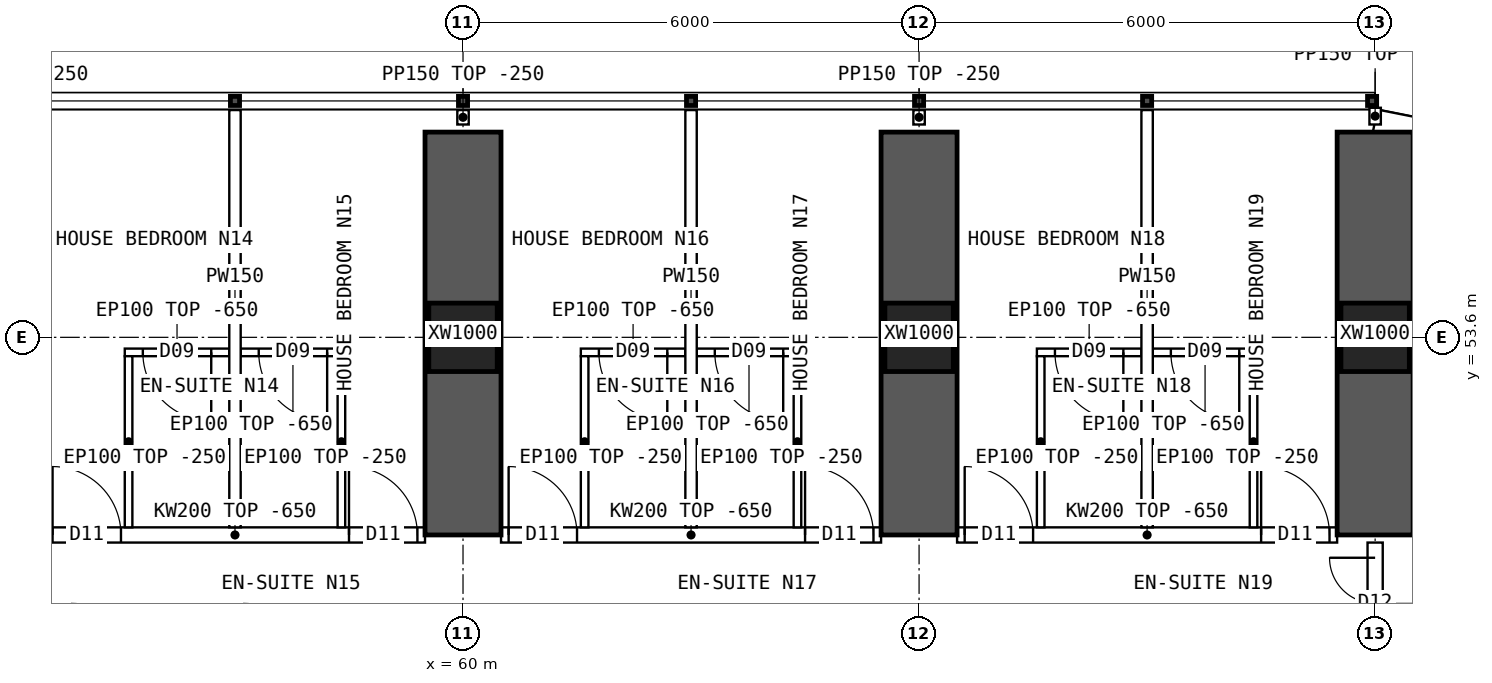
"""IFC4 building model, lengths in metres.
Left out: names, types, materials, properties, quantities, classifications, styles, units other than length and angle.
Written with IfcOpenShell. Run it as: python <this file> out.ifc"""

import sys

from ifc_helpers import new_model, si_unit, direction, frame, frame_2d, origin, origin_2d, place, context, subcontext, project, spatial, polyline, rectangle, hollow_rectangle, outline, extrude, element, fill, save


model = new_model("IFC4")
c1 = context("Model", 3, precision=1e-05, world=origin(), true_north=direction((0.0, 1.0)))
c2 = subcontext(c1, "Body", "Model", "MODEL_VIEW")
j1 = project(units=[si_unit("LENGTHUNIT", "METRE"), si_unit("PLANEANGLEUNIT", "RADIAN")], contexts=[c1])
p1 = place(None, origin())
s1 = spatial("IfcSite", under=j1, at=p1, CompositionType="ELEMENT")
p2 = place(p1, origin())
s2 = spatial("IfcBuilding", under=s1, at=p2, CompositionType="ELEMENT")
p3 = place(p2, frame((0.0, 0.0, 31.45)))
s3 = spatial("IfcBuildingStorey", under=s2, at=p3, CompositionType="ELEMENT", Elevation=31.45)
for number, where, z_axis, x_axis in (
    (1, (60.0, 53.6, 0.0), (0.0, 0.0, 1.0), (1.0, 0.0, 0.0)),
    (2, (66.0, 53.6, 0.0), (0.0, 0.0, 1.0), (1.0, 0.0, 0.0)),
    (3, (72.0, 53.6, 0.0), (0.0, 0.0, 1.0), (1.0, 0.0, 0.0)),
):
    element("IfcColumn", number, at=place(p3, frame(where, z_axis=z_axis, x_axis=x_axis)), inside=s3, PredefinedType="COLUMN", context=c2, shape_type="SweptSolid", body=[
        extrude(hollow_rectangle(XDim=0.9, YDim=0.9, WallThickness=0.09, at=origin_2d()), origin(), (0.0, 0.0, 1.0), 3.75),
    ])
for number, where, z_axis, x_axis in (
    (4, (60.0, 51.0, 0.0), (0.0, 0.0, 1.0), (0.0, 1.0, 0.0)),
    (5, (66.0, 51.0, 0.0), (0.0, 0.0, 1.0), (0.0, 1.0, 0.0)),
    (6, (72.0, 51.0, 0.0), (0.0, 0.0, 1.0), (0.0, 1.0, 0.0)),
):
    element("IfcWall", number, at=place(p3, frame(where, z_axis=z_axis, x_axis=x_axis)), inside=s3, PredefinedType="SHEAR", context=c2, shape_type="SweptSolid", body=[
        extrude(rectangle(XDim=5.3, YDim=1.0, at=frame_2d((2.65, 0.0))), origin(), (0.0, 0.0, 1.0), 3.75),
    ])
p4 = place(p3, frame((75.157, 55.822, 0.0), z_axis=(0.0, 0.0, 1.0), x_axis=(-0.980787251524, 0.195080412259, 0.0)))
e7 = element("IfcWall", 7, at=p4, inside=s3, PredefinedType="SOLIDWALL", context=c2, shape_type="SweptSolid", body=[
    extrude(outline(polyline([(-0.03, -0.15), (3.249, -0.15), (3.189, 0.15), (0.03, 0.15), (-0.03, -0.15)])), origin(), (0.0, 0.0, 1.0), 3.5),
])
p5 = place(p4, frame((0.909, 0.0, 0.9)))
e8 = element("IfcOpeningElement", 8, at=p5, cuts=e7, PredefinedType="OPENING", context=c2, shape_type="SweptSolid", body=[
    extrude(rectangle(XDim=1.4, YDim=1.8, at=frame_2d((0.7, 0.9))), frame((0.0, 0.16, 0.0), z_axis=(0.0, -1.0, 0.0), x_axis=(1.0, 0.0, 0.0)), (0.0, 0.0, 1.0), 0.32),
])
p6 = place(p3, frame((54.5, 51.0, 0.0), z_axis=(0.0, 0.0, 1.0), x_axis=(1.0, 0.0, 0.0)))
e9 = element("IfcWall", 9, at=p6, inside=s3, PredefinedType="SOLIDWALL", context=c2, shape_type="SweptSolid", body=[
    extrude(outline(polyline([(0.0, 0.0), (5.0, 0.0), (5.0, 3.1), (0.0, 3.1), (0.0, 0.0)])), frame((0.0, 0.1, 0.0), z_axis=(0.0, -1.0, 0.0), x_axis=(1.0, 0.0, 0.0)), (0.0, 0.0, 1.0), 0.2),
])
p7 = place(p6, frame((0.1, 0.0, 0.0)))
e10 = element("IfcOpeningElement", 10, at=p7, cuts=e9, PredefinedType="OPENING", context=c2, shape_type="SweptSolid", body=[
    extrude(rectangle(XDim=0.9, YDim=2.1, at=frame_2d((0.45, 1.05))), frame((0.0, 0.11, 0.0), z_axis=(0.0, -1.0, 0.0), x_axis=(1.0, 0.0, 0.0)), (0.0, 0.0, 1.0), 0.22),
])
p8 = place(p6, frame((4.0, 0.0, 0.0)))
e11 = element("IfcOpeningElement", 11, at=p8, cuts=e9, PredefinedType="OPENING", context=c2, shape_type="SweptSolid", body=[
    extrude(rectangle(XDim=0.9, YDim=2.1, at=frame_2d((0.45, 1.05))), frame((0.0, 0.11, 0.0), z_axis=(0.0, -1.0, 0.0), x_axis=(1.0, 0.0, 0.0)), (0.0, 0.0, 1.0), 0.22),
])
p9 = place(p3, frame((60.5, 51.0, 0.0), z_axis=(0.0, 0.0, 1.0), x_axis=(1.0, 0.0, 0.0)))
e12 = element("IfcWall", 12, at=p9, inside=s3, PredefinedType="SOLIDWALL", context=c2, shape_type="SweptSolid", body=[
    extrude(outline(polyline([(0.0, 0.0), (5.0, 0.0), (5.0, 3.1), (0.0, 3.1), (0.0, 0.0)])), frame((0.0, 0.1, 0.0), z_axis=(0.0, -1.0, 0.0), x_axis=(1.0, 0.0, 0.0)), (0.0, 0.0, 1.0), 0.2),
])
p10 = place(p9, frame((0.1, 0.0, 0.0)))
e13 = element("IfcOpeningElement", 13, at=p10, cuts=e12, PredefinedType="OPENING", context=c2, shape_type="SweptSolid", body=[
    extrude(rectangle(XDim=0.9, YDim=2.1, at=frame_2d((0.45, 1.05))), frame((0.0, 0.11, 0.0), z_axis=(0.0, -1.0, 0.0), x_axis=(1.0, 0.0, 0.0)), (0.0, 0.0, 1.0), 0.22),
])
p11 = place(p9, frame((4.0, 0.0, 0.0)))
e14 = element("IfcOpeningElement", 14, at=p11, cuts=e12, PredefinedType="OPENING", context=c2, shape_type="SweptSolid", body=[
    extrude(rectangle(XDim=0.9, YDim=2.1, at=frame_2d((0.45, 1.05))), frame((0.0, 0.11, 0.0), z_axis=(0.0, -1.0, 0.0), x_axis=(1.0, 0.0, 0.0)), (0.0, 0.0, 1.0), 0.22),
])
p12 = place(p3, frame((66.5, 51.0, 0.0), z_axis=(0.0, 0.0, 1.0), x_axis=(1.0, 0.0, 0.0)))
e15 = element("IfcWall", 15, at=p12, inside=s3, PredefinedType="SOLIDWALL", context=c2, shape_type="SweptSolid", body=[
    extrude(outline(polyline([(0.0, 0.0), (5.0, 0.0), (5.0, 3.1), (0.0, 3.1), (0.0, 0.0)])), frame((0.0, 0.1, 0.0), z_axis=(0.0, -1.0, 0.0), x_axis=(1.0, 0.0, 0.0)), (0.0, 0.0, 1.0), 0.2),
])
p13 = place(p12, frame((0.1, 0.0, 0.0)))
e16 = element("IfcOpeningElement", 16, at=p13, cuts=e15, PredefinedType="OPENING", context=c2, shape_type="SweptSolid", body=[
    extrude(rectangle(XDim=0.9, YDim=2.1, at=frame_2d((0.45, 1.05))), frame((0.0, 0.11, 0.0), z_axis=(0.0, -1.0, 0.0), x_axis=(1.0, 0.0, 0.0)), (0.0, 0.0, 1.0), 0.22),
])
p14 = place(p12, frame((4.0, 0.0, 0.0)))
e17 = element("IfcOpeningElement", 17, at=p14, cuts=e15, PredefinedType="OPENING", context=c2, shape_type="SweptSolid", body=[
    extrude(rectangle(XDim=0.9, YDim=2.1, at=frame_2d((0.45, 1.05))), frame((0.0, 0.11, 0.0), z_axis=(0.0, -1.0, 0.0), x_axis=(1.0, 0.0, 0.0)), (0.0, 0.0, 1.0), 0.22),
])
p15 = place(p3, frame((57.0, 56.59, 0.0), z_axis=(0.0, 0.0, 1.0), x_axis=(0.0, -1.0, 0.0)))
e18 = element("IfcWall", 18, at=p15, inside=s3, PredefinedType="PARTITIONING", context=c2, shape_type="SweptSolid", body=[
    extrude(outline(polyline([(0.0, 0.0), (5.49, 0.0), (5.49, 3.1), (5.442, 3.1), (5.44, 3.5), (3.192, 3.5), (3.19, 3.1), (2.792, 3.1), (2.79, 3.5), (0.0, 3.5), (0.0, 0.0)])), frame((0.0, 0.075, 0.0), z_axis=(0.0, -1.0, 0.0), x_axis=(1.0, 0.0, 0.0)), (0.0, 0.0, 1.0), 0.15),
])
p16 = place(p3, frame((55.55, 53.402, 0.0), z_axis=(0.0, 0.0, 1.0), x_axis=(1.0, 0.0, 0.0)))
e19 = element("IfcWall", 19, at=p16, inside=s3, PredefinedType="PARTITIONING", context=c2, shape_type="SweptSolid", body=[
    extrude(outline(polyline([(0.0, 0.0), (1.375, 0.0), (1.375, 3.1), (0.0, 3.1), (0.0, 0.0)])), frame((0.0, 0.05, 0.0), z_axis=(0.0, -1.0, 0.0), x_axis=(1.0, 0.0, 0.0)), (0.0, 0.0, 1.0), 0.1),
])
p17 = place(p16, frame((0.238, 0.0, 0.0)))
e20 = element("IfcOpeningElement", 20, at=p17, cuts=e19, PredefinedType="OPENING", context=c2, shape_type="SweptSolid", body=[
    extrude(rectangle(XDim=0.9, YDim=2.1, at=frame_2d((0.45, 1.05))), frame((0.0, 0.06, 0.0), z_axis=(0.0, -1.0, 0.0), x_axis=(1.0, 0.0, 0.0)), (0.0, 0.0, 1.0), 0.12),
])
p18 = place(p3, frame((55.6, 53.352, 0.0), z_axis=(0.0, 0.0, 1.0), x_axis=(0.0, -1.0, 0.0)))
e21 = element("IfcWall", 21, at=p18, inside=s3, PredefinedType="PARTITIONING", context=c2, shape_type="SweptSolid", body=[
    extrude(outline(polyline([(0.0, 0.0), (2.252, 0.0), (2.252, 3.1), (2.204, 3.1), (2.202, 3.5), (0.0, 3.5), (0.0, 0.0)])), frame((0.0, 0.05, 0.0), z_axis=(0.0, -1.0, 0.0), x_axis=(1.0, 0.0, 0.0)), (0.0, 0.0, 1.0), 0.1),
])
p19 = place(p3, frame((57.075, 53.402, 0.0), z_axis=(0.0, 0.0, 1.0), x_axis=(1.0, 0.0, 0.0)))
e22 = element("IfcWall", 22, at=p19, inside=s3, PredefinedType="PARTITIONING", context=c2, shape_type="SweptSolid", body=[
    extrude(outline(polyline([(0.0, 0.0), (1.375, 0.0), (1.375, 3.1), (0.0, 3.1), (0.0, 0.0)])), frame((0.0, 0.05, 0.0), z_axis=(0.0, -1.0, 0.0), x_axis=(1.0, 0.0, 0.0)), (0.0, 0.0, 1.0), 0.1),
])
p20 = place(p19, frame((0.238, 0.0, 0.0)))
e23 = element("IfcOpeningElement", 23, at=p20, cuts=e22, PredefinedType="OPENING", context=c2, shape_type="SweptSolid", body=[
    extrude(rectangle(XDim=0.9, YDim=2.1, at=frame_2d((0.45, 1.05))), frame((0.0, 0.06, 0.0), z_axis=(0.0, -1.0, 0.0), x_axis=(1.0, 0.0, 0.0)), (0.0, 0.0, 1.0), 0.12),
])
p21 = place(p3, frame((58.4, 53.352, 0.0), z_axis=(0.0, 0.0, 1.0), x_axis=(0.0, -1.0, 0.0)))
e24 = element("IfcWall", 24, at=p21, inside=s3, PredefinedType="PARTITIONING", context=c2, shape_type="SweptSolid", body=[
    extrude(outline(polyline([(0.0, 0.0), (2.252, 0.0), (2.252, 3.1), (2.204, 3.1), (2.202, 3.5), (0.0, 3.5), (0.0, 0.0)])), frame((0.0, 0.05, 0.0), z_axis=(0.0, -1.0, 0.0), x_axis=(1.0, 0.0, 0.0)), (0.0, 0.0, 1.0), 0.1),
])
p22 = place(p3, frame((63.0, 56.59, 0.0), z_axis=(0.0, 0.0, 1.0), x_axis=(0.0, -1.0, 0.0)))
e25 = element("IfcWall", 25, at=p22, inside=s3, PredefinedType="PARTITIONING", context=c2, shape_type="SweptSolid", body=[
    extrude(outline(polyline([(0.0, 0.0), (5.49, 0.0), (5.49, 3.1), (5.442, 3.1), (5.44, 3.5), (3.192, 3.5), (3.19, 3.1), (2.792, 3.1), (2.79, 3.5), (0.0, 3.5), (0.0, 0.0)])), frame((0.0, 0.075, 0.0), z_axis=(0.0, -1.0, 0.0), x_axis=(1.0, 0.0, 0.0)), (0.0, 0.0, 1.0), 0.15),
])
p23 = place(p3, frame((61.55, 53.402, 0.0), z_axis=(0.0, 0.0, 1.0), x_axis=(1.0, 0.0, 0.0)))
e26 = element("IfcWall", 26, at=p23, inside=s3, PredefinedType="PARTITIONING", context=c2, shape_type="SweptSolid", body=[
    extrude(outline(polyline([(0.0, 0.0), (1.375, 0.0), (1.375, 3.1), (0.0, 3.1), (0.0, 0.0)])), frame((0.0, 0.05, 0.0), z_axis=(0.0, -1.0, 0.0), x_axis=(1.0, 0.0, 0.0)), (0.0, 0.0, 1.0), 0.1),
])
p24 = place(p23, frame((0.238, 0.0, 0.0)))
e27 = element("IfcOpeningElement", 27, at=p24, cuts=e26, PredefinedType="OPENING", context=c2, shape_type="SweptSolid", body=[
    extrude(rectangle(XDim=0.9, YDim=2.1, at=frame_2d((0.45, 1.05))), frame((0.0, 0.06, 0.0), z_axis=(0.0, -1.0, 0.0), x_axis=(1.0, 0.0, 0.0)), (0.0, 0.0, 1.0), 0.12),
])
p25 = place(p3, frame((61.6, 53.352, 0.0), z_axis=(0.0, 0.0, 1.0), x_axis=(0.0, -1.0, 0.0)))
e28 = element("IfcWall", 28, at=p25, inside=s3, PredefinedType="PARTITIONING", context=c2, shape_type="SweptSolid", body=[
    extrude(outline(polyline([(0.0, 0.0), (2.252, 0.0), (2.252, 3.1), (2.204, 3.1), (2.202, 3.5), (0.0, 3.5), (0.0, 0.0)])), frame((0.0, 0.05, 0.0), z_axis=(0.0, -1.0, 0.0), x_axis=(1.0, 0.0, 0.0)), (0.0, 0.0, 1.0), 0.1),
])
p26 = place(p3, frame((63.075, 53.402, 0.0), z_axis=(0.0, 0.0, 1.0), x_axis=(1.0, 0.0, 0.0)))
e29 = element("IfcWall", 29, at=p26, inside=s3, PredefinedType="PARTITIONING", context=c2, shape_type="SweptSolid", body=[
    extrude(outline(polyline([(0.0, 0.0), (1.375, 0.0), (1.375, 3.1), (0.0, 3.1), (0.0, 0.0)])), frame((0.0, 0.05, 0.0), z_axis=(0.0, -1.0, 0.0), x_axis=(1.0, 0.0, 0.0)), (0.0, 0.0, 1.0), 0.1),
])
p27 = place(p26, frame((0.238, 0.0, 0.0)))
e30 = element("IfcOpeningElement", 30, at=p27, cuts=e29, PredefinedType="OPENING", context=c2, shape_type="SweptSolid", body=[
    extrude(rectangle(XDim=0.9, YDim=2.1, at=frame_2d((0.45, 1.05))), frame((0.0, 0.06, 0.0), z_axis=(0.0, -1.0, 0.0), x_axis=(1.0, 0.0, 0.0)), (0.0, 0.0, 1.0), 0.12),
])
p28 = place(p3, frame((64.4, 53.352, 0.0), z_axis=(0.0, 0.0, 1.0), x_axis=(0.0, -1.0, 0.0)))
e31 = element("IfcWall", 31, at=p28, inside=s3, PredefinedType="PARTITIONING", context=c2, shape_type="SweptSolid", body=[
    extrude(outline(polyline([(0.0, 0.0), (2.252, 0.0), (2.252, 3.1), (2.204, 3.1), (2.202, 3.5), (0.0, 3.5), (0.0, 0.0)])), frame((0.0, 0.05, 0.0), z_axis=(0.0, -1.0, 0.0), x_axis=(1.0, 0.0, 0.0)), (0.0, 0.0, 1.0), 0.1),
])
p29 = place(p3, frame((69.0, 56.59, 0.0), z_axis=(0.0, 0.0, 1.0), x_axis=(0.0, -1.0, 0.0)))
e32 = element("IfcWall", 32, at=p29, inside=s3, PredefinedType="PARTITIONING", context=c2, shape_type="SweptSolid", body=[
    extrude(outline(polyline([(0.0, 0.0), (5.49, 0.0), (5.49, 3.1), (5.442, 3.1), (5.44, 3.5), (3.192, 3.5), (3.19, 3.1), (2.792, 3.1), (2.79, 3.5), (0.0, 3.5), (0.0, 0.0)])), frame((0.0, 0.075, 0.0), z_axis=(0.0, -1.0, 0.0), x_axis=(1.0, 0.0, 0.0)), (0.0, 0.0, 1.0), 0.15),
])
p30 = place(p3, frame((67.55, 53.402, 0.0), z_axis=(0.0, 0.0, 1.0), x_axis=(1.0, 0.0, 0.0)))
e33 = element("IfcWall", 33, at=p30, inside=s3, PredefinedType="PARTITIONING", context=c2, shape_type="SweptSolid", body=[
    extrude(outline(polyline([(0.0, 0.0), (1.375, 0.0), (1.375, 3.1), (0.0, 3.1), (0.0, 0.0)])), frame((0.0, 0.05, 0.0), z_axis=(0.0, -1.0, 0.0), x_axis=(1.0, 0.0, 0.0)), (0.0, 0.0, 1.0), 0.1),
])
p31 = place(p30, frame((0.238, 0.0, 0.0)))
e34 = element("IfcOpeningElement", 34, at=p31, cuts=e33, PredefinedType="OPENING", context=c2, shape_type="SweptSolid", body=[
    extrude(rectangle(XDim=0.9, YDim=2.1, at=frame_2d((0.45, 1.05))), frame((0.0, 0.06, 0.0), z_axis=(0.0, -1.0, 0.0), x_axis=(1.0, 0.0, 0.0)), (0.0, 0.0, 1.0), 0.12),
])
p32 = place(p3, frame((67.6, 53.352, 0.0), z_axis=(0.0, 0.0, 1.0), x_axis=(0.0, -1.0, 0.0)))
e35 = element("IfcWall", 35, at=p32, inside=s3, PredefinedType="PARTITIONING", context=c2, shape_type="SweptSolid", body=[
    extrude(outline(polyline([(0.0, 0.0), (2.252, 0.0), (2.252, 3.1), (2.204, 3.1), (2.202, 3.5), (0.0, 3.5), (0.0, 0.0)])), frame((0.0, 0.05, 0.0), z_axis=(0.0, -1.0, 0.0), x_axis=(1.0, 0.0, 0.0)), (0.0, 0.0, 1.0), 0.1),
])
p33 = place(p3, frame((69.075, 53.402, 0.0), z_axis=(0.0, 0.0, 1.0), x_axis=(1.0, 0.0, 0.0)))
e36 = element("IfcWall", 36, at=p33, inside=s3, PredefinedType="PARTITIONING", context=c2, shape_type="SweptSolid", body=[
    extrude(outline(polyline([(0.0, 0.0), (1.375, 0.0), (1.375, 3.1), (0.0, 3.1), (0.0, 0.0)])), frame((0.0, 0.05, 0.0), z_axis=(0.0, -1.0, 0.0), x_axis=(1.0, 0.0, 0.0)), (0.0, 0.0, 1.0), 0.1),
])
p34 = place(p33, frame((0.238, 0.0, 0.0)))
e37 = element("IfcOpeningElement", 37, at=p34, cuts=e36, PredefinedType="OPENING", context=c2, shape_type="SweptSolid", body=[
    extrude(rectangle(XDim=0.9, YDim=2.1, at=frame_2d((0.45, 1.05))), frame((0.0, 0.06, 0.0), z_axis=(0.0, -1.0, 0.0), x_axis=(1.0, 0.0, 0.0)), (0.0, 0.0, 1.0), 0.12),
])
p35 = place(p3, frame((70.4, 53.352, 0.0), z_axis=(0.0, 0.0, 1.0), x_axis=(0.0, -1.0, 0.0)))
e38 = element("IfcWall", 38, at=p35, inside=s3, PredefinedType="PARTITIONING", context=c2, shape_type="SweptSolid", body=[
    extrude(outline(polyline([(0.0, 0.0), (2.252, 0.0), (2.252, 3.1), (2.204, 3.1), (2.202, 3.5), (0.0, 3.5), (0.0, 0.0)])), frame((0.0, 0.05, 0.0), z_axis=(0.0, -1.0, 0.0), x_axis=(1.0, 0.0, 0.0)), (0.0, 0.0, 1.0), 0.1),
])
p36 = place(p3, frame((72.0, 49.3, 0.0), z_axis=(0.0, 0.0, 1.0), x_axis=(0.0, 1.0, 0.0)))
e39 = element("IfcWall", 39, at=p36, inside=s3, PredefinedType="SOLIDWALL", context=c2, shape_type="SweptSolid", body=[
    extrude(outline(polyline([(0.0, 0.0), (1.6, 0.0), (1.6, 3.05), (0.0, 3.05), (0.0, 0.0)])), frame((0.0, 0.1, 0.0), z_axis=(0.0, -1.0, 0.0), x_axis=(1.0, 0.0, 0.0)), (0.0, 0.0, 1.0), 0.2),
])
p37 = place(p36, frame((0.2, 0.0, 0.0)))
e40 = element("IfcOpeningElement", 40, at=p37, cuts=e39, PredefinedType="OPENING", context=c2, shape_type="SweptSolid", body=[
    extrude(rectangle(XDim=1.2, YDim=2.1, at=frame_2d((0.6, 1.05))), frame((0.0, 0.11, 0.0), z_axis=(0.0, -1.0, 0.0), x_axis=(1.0, 0.0, 0.0)), (0.0, 0.0, 1.0), 0.22),
])
for number, where, z_axis, x_axis in (
    (41, (60.0, 56.4, 0.0), (0.0, 0.0, 1.0), (0.0, 1.0, 0.0)),
    (42, (66.0, 56.4, 0.0), (0.0, 0.0, 1.0), (0.0, 1.0, 0.0)),
):
    element("IfcWall", number, at=place(p3, frame(where, z_axis=z_axis, x_axis=x_axis)), inside=s3, PredefinedType="PARTITIONING", context=c2, shape_type="SweptSolid", body=[
        extrude(rectangle(XDim=0.19, YDim=0.15, at=frame_2d((0.095, 0.0))), origin(), (0.0, 0.0, 1.0), 3.5),
    ])
p38 = place(p3, frame((72.0, 56.4, 0.0), z_axis=(0.0, 0.0, 1.0), x_axis=(0.0, 1.0, 0.0)))
e43 = element("IfcWall", 43, at=p38, inside=s3, PredefinedType="PARTITIONING", context=c2, shape_type="SweptSolid", body=[
    extrude(rectangle(XDim=0.22, YDim=0.15, at=frame_2d((0.11, 0.0))), origin(), (0.0, 0.0, 1.0), 3.5),
])
p39 = place(p17, origin())
e44 = element("IfcDoor", 44, at=p39, inside=s3, OperationType="SINGLE_SWING_RIGHT", PredefinedType="DOOR", context=c2, shape_type="SweptSolid", body=[
    extrude(rectangle(XDim=0.9, YDim=2.1, at=frame_2d((0.45, 1.05))), frame((0.0, 0.025, 0.0), z_axis=(0.0, -1.0, 0.0), x_axis=(1.0, 0.0, 0.0)), (0.0, 0.0, 1.0), 0.05),
])
fill(e20, e44)
p40 = place(p7, origin())
e45 = element("IfcDoor", 45, at=p40, inside=s3, OperationType="SINGLE_SWING_LEFT", PredefinedType="DOOR", context=c2, shape_type="SweptSolid", body=[
    extrude(rectangle(XDim=0.9, YDim=2.1, at=frame_2d((0.45, 1.05))), frame((0.0, 0.025, 0.0), z_axis=(0.0, -1.0, 0.0), x_axis=(1.0, 0.0, 0.0)), (0.0, 0.0, 1.0), 0.05),
])
fill(e10, e45)
p41 = place(p20, origin())
e46 = element("IfcDoor", 46, at=p41, inside=s3, OperationType="SINGLE_SWING_RIGHT", PredefinedType="DOOR", context=c2, shape_type="SweptSolid", body=[
    extrude(rectangle(XDim=0.9, YDim=2.1, at=frame_2d((0.45, 1.05))), frame((0.0, 0.025, 0.0), z_axis=(0.0, -1.0, 0.0), x_axis=(1.0, 0.0, 0.0)), (0.0, 0.0, 1.0), 0.05),
])
fill(e23, e46)
p42 = place(p8, origin())
e47 = element("IfcDoor", 47, at=p42, inside=s3, OperationType="SINGLE_SWING_LEFT", PredefinedType="DOOR", context=c2, shape_type="SweptSolid", body=[
    extrude(rectangle(XDim=0.9, YDim=2.1, at=frame_2d((0.45, 1.05))), frame((0.0, 0.025, 0.0), z_axis=(0.0, -1.0, 0.0), x_axis=(1.0, 0.0, 0.0)), (0.0, 0.0, 1.0), 0.05),
])
fill(e11, e47)
p43 = place(p24, origin())
e48 = element("IfcDoor", 48, at=p43, inside=s3, OperationType="SINGLE_SWING_RIGHT", PredefinedType="DOOR", context=c2, shape_type="SweptSolid", body=[
    extrude(rectangle(XDim=0.9, YDim=2.1, at=frame_2d((0.45, 1.05))), frame((0.0, 0.025, 0.0), z_axis=(0.0, -1.0, 0.0), x_axis=(1.0, 0.0, 0.0)), (0.0, 0.0, 1.0), 0.05),
])
fill(e27, e48)
p44 = place(p10, origin())
e49 = element("IfcDoor", 49, at=p44, inside=s3, OperationType="SINGLE_SWING_LEFT", PredefinedType="DOOR", context=c2, shape_type="SweptSolid", body=[
    extrude(rectangle(XDim=0.9, YDim=2.1, at=frame_2d((0.45, 1.05))), frame((0.0, 0.025, 0.0), z_axis=(0.0, -1.0, 0.0), x_axis=(1.0, 0.0, 0.0)), (0.0, 0.0, 1.0), 0.05),
])
fill(e13, e49)
p45 = place(p27, origin())
e50 = element("IfcDoor", 50, at=p45, inside=s3, OperationType="SINGLE_SWING_RIGHT", PredefinedType="DOOR", context=c2, shape_type="SweptSolid", body=[
    extrude(rectangle(XDim=0.9, YDim=2.1, at=frame_2d((0.45, 1.05))), frame((0.0, 0.025, 0.0), z_axis=(0.0, -1.0, 0.0), x_axis=(1.0, 0.0, 0.0)), (0.0, 0.0, 1.0), 0.05),
])
fill(e30, e50)
p46 = place(p11, origin())
e51 = element("IfcDoor", 51, at=p46, inside=s3, OperationType="SINGLE_SWING_LEFT", PredefinedType="DOOR", context=c2, shape_type="SweptSolid", body=[
    extrude(rectangle(XDim=0.9, YDim=2.1, at=frame_2d((0.45, 1.05))), frame((0.0, 0.025, 0.0), z_axis=(0.0, -1.0, 0.0), x_axis=(1.0, 0.0, 0.0)), (0.0, 0.0, 1.0), 0.05),
])
fill(e14, e51)
p47 = place(p31, origin())
e52 = element("IfcDoor", 52, at=p47, inside=s3, OperationType="SINGLE_SWING_RIGHT", PredefinedType="DOOR", context=c2, shape_type="SweptSolid", body=[
    extrude(rectangle(XDim=0.9, YDim=2.1, at=frame_2d((0.45, 1.05))), frame((0.0, 0.025, 0.0), z_axis=(0.0, -1.0, 0.0), x_axis=(1.0, 0.0, 0.0)), (0.0, 0.0, 1.0), 0.05),
])
fill(e34, e52)
p48 = place(p13, origin())
e53 = element("IfcDoor", 53, at=p48, inside=s3, OperationType="SINGLE_SWING_LEFT", PredefinedType="DOOR", context=c2, shape_type="SweptSolid", body=[
    extrude(rectangle(XDim=0.9, YDim=2.1, at=frame_2d((0.45, 1.05))), frame((0.0, 0.025, 0.0), z_axis=(0.0, -1.0, 0.0), x_axis=(1.0, 0.0, 0.0)), (0.0, 0.0, 1.0), 0.05),
])
fill(e16, e53)
p49 = place(p34, origin())
e54 = element("IfcDoor", 54, at=p49, inside=s3, OperationType="SINGLE_SWING_RIGHT", PredefinedType="DOOR", context=c2, shape_type="SweptSolid", body=[
    extrude(rectangle(XDim=0.9, YDim=2.1, at=frame_2d((0.45, 1.05))), frame((0.0, 0.025, 0.0), z_axis=(0.0, -1.0, 0.0), x_axis=(1.0, 0.0, 0.0)), (0.0, 0.0, 1.0), 0.05),
])
fill(e37, e54)
p50 = place(p14, origin())
e55 = element("IfcDoor", 55, at=p50, inside=s3, OperationType="SINGLE_SWING_LEFT", PredefinedType="DOOR", context=c2, shape_type="SweptSolid", body=[
    extrude(rectangle(XDim=0.9, YDim=2.1, at=frame_2d((0.45, 1.05))), frame((0.0, 0.025, 0.0), z_axis=(0.0, -1.0, 0.0), x_axis=(1.0, 0.0, 0.0)), (0.0, 0.0, 1.0), 0.05),
])
fill(e17, e55)
p51 = place(p37, origin())
e56 = element("IfcDoor", 56, at=p51, inside=s3, OperationType="DOUBLE_DOOR_SINGLE_SWING", PredefinedType="DOOR", context=c2, shape_type="SweptSolid", body=[
    extrude(rectangle(XDim=1.2, YDim=2.1, at=frame_2d((0.6, 1.05))), frame((0.0, 0.025, 0.0), z_axis=(0.0, -1.0, 0.0), x_axis=(1.0, 0.0, 0.0)), (0.0, 0.0, 1.0), 0.05),
])
fill(e40, e56)
save(model, sys.argv[1])
